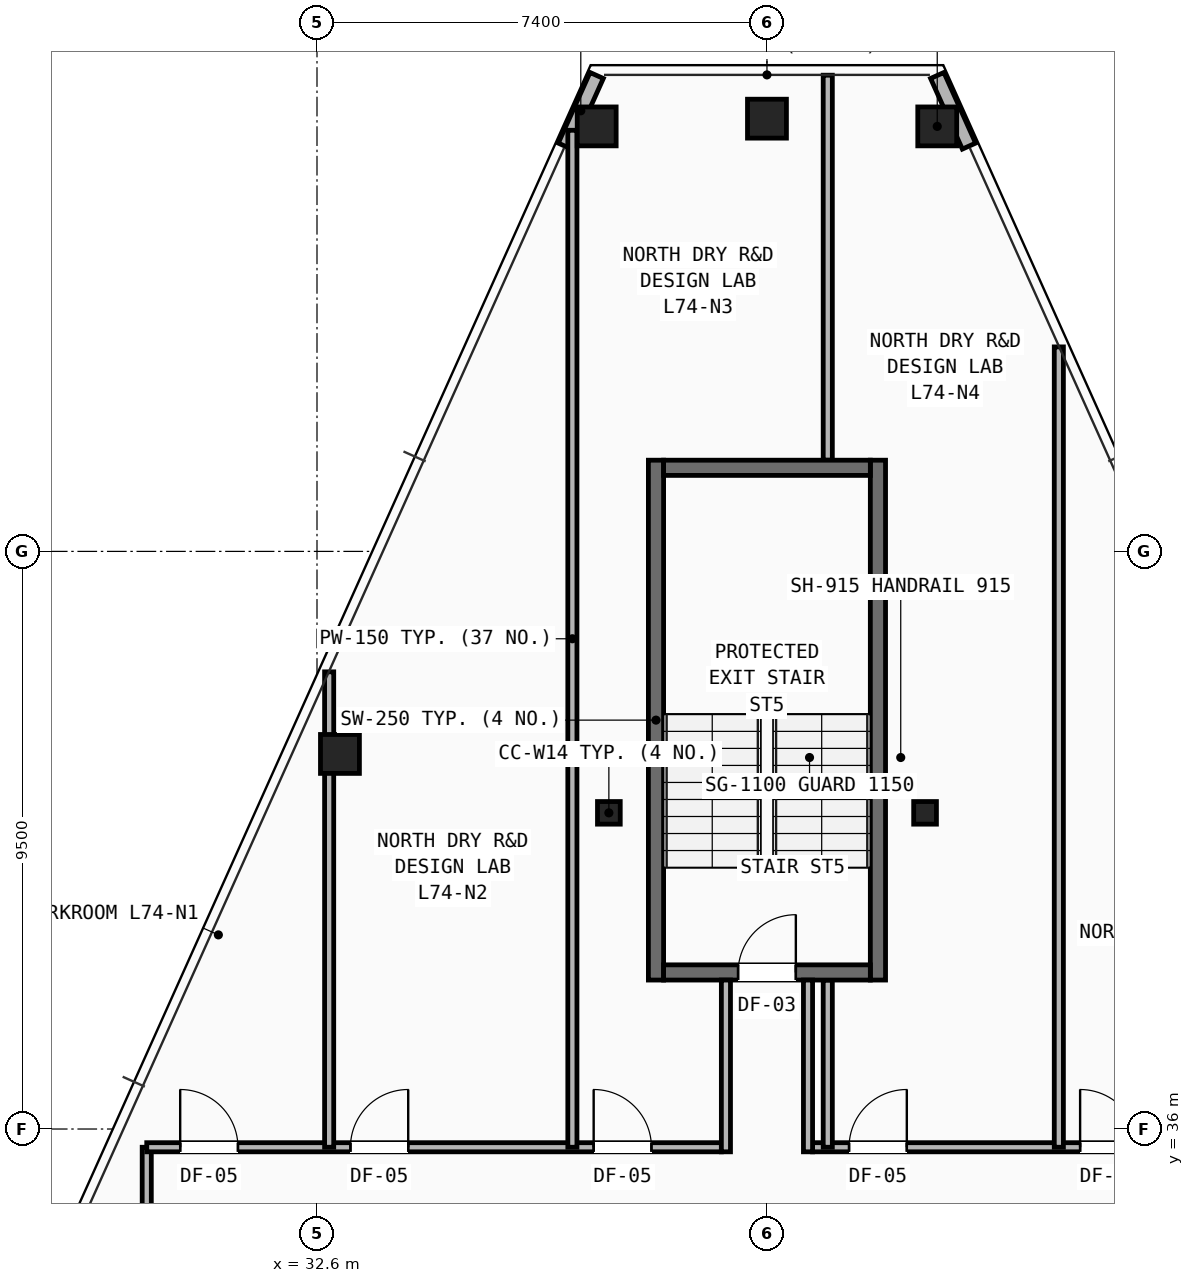
"""IFC4 building model, lengths in metres.
Left out: names, types, materials, properties, quantities, classifications, styles, units other than length and angle.
Written with IfcOpenShell. Run it as: python <this file> out.ifc"""

import sys

from ifc_helpers import new_model, si_unit, direction, frame, frame_2d, origin, origin_2d, place, context, subcontext, project, spatial, rectangle, hollow_rectangle, i_section, extrude, element, fill, save


model = new_model("IFC4")
c1 = context("Model", 3, precision=1e-05, world=origin(), true_north=direction((0.0, 1.0)))
c2 = subcontext(c1, "Body", "Model", "MODEL_VIEW")
j1 = project(units=[si_unit("LENGTHUNIT", "METRE"), si_unit("PLANEANGLEUNIT", "RADIAN")], contexts=[c1])
p1 = place(None, origin())
s1 = spatial("IfcSite", under=j1, at=p1, CompositionType="ELEMENT")
p2 = place(p1, origin())
s2 = spatial("IfcBuilding", under=s1, at=p2, CompositionType="ELEMENT")
p3 = place(p2, frame((0.0, 0.0, 262.0)))
s3 = spatial("IfcBuildingStorey", under=s2, at=p3, CompositionType="ELEMENT", Elevation=262.0)
for number, where, z_axis, x_axis in (
    (1, (37.4, 41.2, 0.0), (0.0, 0.0, 1.0), (1.0, 0.0, 0.0)),
    (2, (42.6, 41.2, 0.0), (0.0, 0.0, 1.0), (1.0, 0.0, 0.0)),
):
    element("IfcColumn", number, at=place(p3, frame(where, z_axis=z_axis, x_axis=x_axis)), inside=s3, PredefinedType="COLUMN", context=c2, shape_type="SweptSolid", body=[
        extrude(i_section(OverallWidth=0.374, OverallDepth=0.372, WebThickness=0.016, FlangeThickness=0.026, at=origin_2d()), origin(), (0.0, 0.0, 1.0), 3.5),
    ])
for number, where, z_axis, x_axis in (
    (3, (42.8, 52.49, 0.0), (0.0, 0.0, 1.0), (1.0, 0.0, 0.0)),
    (4, (40.0, 52.617, 0.0), (0.0, 0.0, 1.0), (1.0, 0.0, 0.0)),
    (5, (37.2, 52.49, 0.0), (0.0, 0.0, 1.0), (1.0, 0.0, 0.0)),
    (6, (32.977, 42.169, 0.0), (0.0, 0.0, 1.0), (1.0, 0.0, 0.0)),
):
    element("IfcColumn", number, at=place(p3, frame(where, z_axis=z_axis, x_axis=x_axis)), inside=s3, PredefinedType="COLUMN", context=c2, shape_type="SweptSolid", body=[
        extrude(hollow_rectangle(XDim=0.64, YDim=0.64, WallThickness=0.045, at=origin_2d()), origin(), (0.0, 0.0, 1.0), 3.5),
    ])
for number, where, z_axis, x_axis in (
    (7, (37.199, 53.328, 0.0), (0.0, 0.0, 1.0), (-0.41, -0.912, 0.0)),
    (8, (43.323, 52.166, 0.0), (0.0, 0.0, 1.0), (-0.41, 0.912, 0.0)),
):
    element("IfcWall", number, at=place(p3, frame(where, z_axis=z_axis, x_axis=x_axis)), inside=s3, PredefinedType="SHEAR", context=c2, shape_type="SweptSolid", body=[
        extrude(rectangle(XDim=1.274, YDim=0.24, at=frame_2d((0.637, 0.0))), origin(), (0.0, 0.0, 1.0), 2.623),
    ])
p4 = place(p3, frame((29.8, 16.4, 0.0), z_axis=(0.0, 0.0, 1.0), x_axis=(0.0, 1.0, 0.0)))
e9 = element("IfcWall", 9, at=p4, inside=s3, PredefinedType="PARTITIONING", context=c2, shape_type="SweptSolid", body=[
    extrude(rectangle(XDim=19.3, YDim=0.15, at=frame_2d((9.65, 0.0))), origin(), (0.0, 0.0, 1.0), 2.265),
])
p5 = place(p4, frame((0.35, 0.0, 0.0)))
e10 = element("IfcOpeningElement", 10, at=p5, cuts=e9, PredefinedType="OPENING", context=c2, shape_type="SweptSolid", body=[
    extrude(rectangle(XDim=0.95, YDim=2.1, at=frame_2d((0.475, 1.05))), frame((0.0, 0.085, 0.0), z_axis=(0.0, -1.0, 0.0), x_axis=(1.0, 0.0, 0.0)), (0.0, 0.0, 1.0), 0.17),
])
p6 = place(p4, frame((2.95, 0.0, 0.0)))
e11 = element("IfcOpeningElement", 11, at=p6, cuts=e9, PredefinedType="OPENING", context=c2, shape_type="SweptSolid", body=[
    extrude(rectangle(XDim=0.95, YDim=2.1, at=frame_2d((0.475, 1.05))), frame((0.0, 0.085, 0.0), z_axis=(0.0, -1.0, 0.0), x_axis=(1.0, 0.0, 0.0)), (0.0, 0.0, 1.0), 0.17),
])
p7 = place(p4, frame((6.15, 0.0, 0.0)))
e12 = element("IfcOpeningElement", 12, at=p7, cuts=e9, PredefinedType="OPENING", context=c2, shape_type="SweptSolid", body=[
    extrude(rectangle(XDim=0.95, YDim=2.1, at=frame_2d((0.475, 1.05))), frame((0.0, 0.085, 0.0), z_axis=(0.0, -1.0, 0.0), x_axis=(1.0, 0.0, 0.0)), (0.0, 0.0, 1.0), 0.17),
])
p8 = place(p4, frame((9.45, 0.0, 0.0)))
e13 = element("IfcOpeningElement", 13, at=p8, cuts=e9, PredefinedType="OPENING", context=c2, shape_type="SweptSolid", body=[
    extrude(rectangle(XDim=0.95, YDim=2.1, at=frame_2d((0.475, 1.05))), frame((0.0, 0.085, 0.0), z_axis=(0.0, -1.0, 0.0), x_axis=(1.0, 0.0, 0.0)), (0.0, 0.0, 1.0), 0.17),
])
p9 = place(p4, frame((12.95, 0.0, 0.0)))
e14 = element("IfcOpeningElement", 14, at=p9, cuts=e9, PredefinedType="OPENING", context=c2, shape_type="SweptSolid", body=[
    extrude(rectangle(XDim=0.95, YDim=2.1, at=frame_2d((0.475, 1.05))), frame((0.0, 0.085, 0.0), z_axis=(0.0, -1.0, 0.0), x_axis=(1.0, 0.0, 0.0)), (0.0, 0.0, 1.0), 0.17),
])
p10 = place(p3, frame((29.8, 35.7, 0.0), z_axis=(0.0, 0.0, 1.0), x_axis=(1.0, 0.0, 0.0)))
e15 = element("IfcWall", 15, at=p10, inside=s3, PredefinedType="PARTITIONING", context=c2, shape_type="SweptSolid", body=[
    extrude(rectangle(XDim=9.45, YDim=0.15, at=frame_2d((4.725, 0.0))), origin(), (0.0, 0.0, 1.0), 2.628),
])
p11 = place(p10, frame((0.55, 0.0, 0.0)))
e16 = element("IfcOpeningElement", 16, at=p11, cuts=e15, PredefinedType="OPENING", context=c2, shape_type="SweptSolid", body=[
    extrude(rectangle(XDim=0.95, YDim=2.1, at=frame_2d((0.475, 1.05))), frame((0.0, 0.085, 0.0), z_axis=(0.0, -1.0, 0.0), x_axis=(1.0, 0.0, 0.0)), (0.0, 0.0, 1.0), 0.17),
])
p12 = place(p10, frame((3.35, 0.0, 0.0)))
e17 = element("IfcOpeningElement", 17, at=p12, cuts=e15, PredefinedType="OPENING", context=c2, shape_type="SweptSolid", body=[
    extrude(rectangle(XDim=0.95, YDim=2.1, at=frame_2d((0.475, 1.05))), frame((0.0, 0.085, 0.0), z_axis=(0.0, -1.0, 0.0), x_axis=(1.0, 0.0, 0.0)), (0.0, 0.0, 1.0), 0.17),
])
p13 = place(p10, frame((7.35, 0.0, 0.0)))
e18 = element("IfcOpeningElement", 18, at=p13, cuts=e15, PredefinedType="OPENING", context=c2, shape_type="SweptSolid", body=[
    extrude(rectangle(XDim=0.95, YDim=2.1, at=frame_2d((0.475, 1.05))), frame((0.0, 0.085, 0.0), z_axis=(0.0, -1.0, 0.0), x_axis=(1.0, 0.0, 0.0)), (0.0, 0.0, 1.0), 0.17),
])
p14 = place(p3, frame((40.75, 35.7, 0.0), z_axis=(0.0, 0.0, 1.0), x_axis=(1.0, 0.0, 0.0)))
e19 = element("IfcWall", 19, at=p14, inside=s3, PredefinedType="PARTITIONING", context=c2, shape_type="SweptSolid", body=[
    extrude(rectangle(XDim=6.05, YDim=0.15, at=frame_2d((3.025, 0.0))), origin(), (0.0, 0.0, 1.0), 3.25),
])
p15 = place(p14, frame((0.6, 0.0, 0.0)))
e20 = element("IfcOpeningElement", 20, at=p15, cuts=e19, PredefinedType="OPENING", context=c2, shape_type="SweptSolid", body=[
    extrude(rectangle(XDim=0.95, YDim=2.1, at=frame_2d((0.475, 1.05))), frame((0.0, 0.085, 0.0), z_axis=(0.0, -1.0, 0.0), x_axis=(1.0, 0.0, 0.0)), (0.0, 0.0, 1.0), 0.17),
])
p16 = place(p14, frame((4.4, 0.0, 0.0)))
e21 = element("IfcOpeningElement", 21, at=p16, cuts=e19, PredefinedType="OPENING", context=c2, shape_type="SweptSolid", body=[
    extrude(rectangle(XDim=0.95, YDim=2.1, at=frame_2d((0.475, 1.05))), frame((0.0, 0.085, 0.0), z_axis=(0.0, -1.0, 0.0), x_axis=(1.0, 0.0, 0.0)), (0.0, 0.0, 1.0), 0.17),
])
p17 = place(p3, frame((32.8, 35.7, 0.0), z_axis=(0.0, 0.0, 1.0), x_axis=(0.0, 1.0, 0.0)))
e22 = element("IfcWall", 22, at=p17, inside=s3, PredefinedType="PARTITIONING", context=c2, shape_type="SweptSolid", body=[
    extrude(rectangle(XDim=7.819, YDim=0.15, at=frame_2d((3.91, 0.0))), origin(), (0.0, 0.0, 1.0), 2.265),
])
p18 = place(p3, frame((36.8, 35.7, 0.0), z_axis=(0.0, 0.0, 1.0), x_axis=(0.0, 1.0, 0.0)))
e23 = element("IfcWall", 23, at=p18, inside=s3, PredefinedType="PARTITIONING", context=c2, shape_type="SweptSolid", body=[
    extrude(rectangle(XDim=16.726, YDim=0.15, at=frame_2d((8.363, 0.0))), origin(), (0.0, 0.0, 1.0), 2.265),
])
p19 = place(p3, frame((41.0, 35.7, 0.0), z_axis=(0.0, 0.0, 1.0), x_axis=(0.0, 1.0, 0.0)))
e24 = element("IfcWall", 24, at=p19, inside=s3, PredefinedType="PARTITIONING", context=c2, shape_type="SweptSolid", body=[
    extrude(rectangle(XDim=2.75, YDim=0.15, at=frame_2d((1.375, 0.0))), origin(), (0.0, 0.0, 1.0), 3.25),
])
p20 = place(p3, frame((41.0, 47.0, 0.0), z_axis=(0.0, 0.0, 1.0), x_axis=(0.0, 1.0, 0.0)))
e25 = element("IfcWall", 25, at=p20, inside=s3, PredefinedType="PARTITIONING", context=c2, shape_type="SweptSolid", body=[
    extrude(rectangle(XDim=6.332, YDim=0.15, at=frame_2d((3.166, 0.0))), origin(), (0.0, 0.0, 1.0), 2.628),
])
p21 = place(p3, frame((44.8, 35.7, 0.0), z_axis=(0.0, 0.0, 1.0), x_axis=(0.0, 1.0, 0.0)))
e26 = element("IfcWall", 26, at=p21, inside=s3, PredefinedType="PARTITIONING", context=c2, shape_type="SweptSolid", body=[
    extrude(rectangle(XDim=13.163, YDim=0.15, at=frame_2d((6.582, 0.0))), origin(), (0.0, 0.0, 1.0), 2.265),
])
for number, where, z_axis, x_axis in (
    (27, (38.175, 38.45, 0.0), (0.0, 0.0, 1.0), (0.0, 1.0, 0.0)),
    (28, (41.825, 38.45, 0.0), (0.0, 0.0, 1.0), (0.0, 1.0, 0.0)),
):
    element("IfcWall", number, at=place(p3, frame(where, z_axis=z_axis, x_axis=x_axis)), inside=s3, PredefinedType="SHEAR", context=c2, shape_type="SweptSolid", body=[
        extrude(rectangle(XDim=8.55, YDim=0.25, at=frame_2d((4.275, 0.0))), origin(), (0.0, 0.0, 1.0), 3.25),
    ])
p22 = place(p3, frame((38.3, 38.575, 0.0), z_axis=(0.0, 0.0, 1.0), x_axis=(1.0, 0.0, 0.0)))
e29 = element("IfcWall", 29, at=p22, inside=s3, PredefinedType="SHEAR", context=c2, shape_type="SweptSolid", body=[
    extrude(rectangle(XDim=3.4, YDim=0.25, at=frame_2d((1.7, 0.0))), origin(), (0.0, 0.0, 1.0), 3.25),
])
p23 = place(p22, frame((1.225, 0.0, 0.0)))
e30 = element("IfcOpeningElement", 30, at=p23, cuts=e29, PredefinedType="OPENING", context=c2, shape_type="SweptSolid", body=[
    extrude(rectangle(XDim=0.95, YDim=2.1, at=frame_2d((0.475, 1.05))), frame((0.0, 0.135, 0.0), z_axis=(0.0, -1.0, 0.0), x_axis=(1.0, 0.0, 0.0)), (0.0, 0.0, 1.0), 0.27),
])
p24 = place(p3, frame((38.3, 46.875, 0.0), z_axis=(0.0, 0.0, 1.0), x_axis=(1.0, 0.0, 0.0)))
e31 = element("IfcWall", 31, at=p24, inside=s3, PredefinedType="SHEAR", context=c2, shape_type="SweptSolid", body=[
    extrude(rectangle(XDim=3.4, YDim=0.25, at=frame_2d((1.7, 0.0))), origin(), (0.0, 0.0, 1.0), 3.25),
])
for number, where, z_axis, x_axis in (
    (32, (39.325, 35.625, 0.0), (0.0, 0.0, 1.0), (0.0, 1.0, 0.0)),
    (33, (40.675, 35.625, 0.0), (0.0, 0.0, 1.0), (0.0, 1.0, 0.0)),
):
    element("IfcWall", number, at=place(p3, frame(where, z_axis=z_axis, x_axis=x_axis)), inside=s3, PredefinedType="PARTITIONING", context=c2, shape_type="SweptSolid", body=[
        extrude(rectangle(XDim=2.825, YDim=0.15, at=frame_2d((1.413, 0.0))), origin(), (0.0, 0.0, 1.0), 3.25),
    ])
p25 = place(p11, origin())
e34 = element("IfcDoor", 34, at=p25, inside=s3, OperationType="SINGLE_SWING_LEFT", PredefinedType="DOOR", context=c2, shape_type="SweptSolid", body=[
    extrude(rectangle(XDim=0.95, YDim=2.1, at=frame_2d((0.475, 1.05))), frame((0.0, 0.025, 0.0), z_axis=(0.0, -1.0, 0.0), x_axis=(1.0, 0.0, 0.0)), (0.0, 0.0, 1.0), 0.05),
])
fill(e16, e34)
p26 = place(p12, origin())
e35 = element("IfcDoor", 35, at=p26, inside=s3, OperationType="SINGLE_SWING_RIGHT", PredefinedType="DOOR", context=c2, shape_type="SweptSolid", body=[
    extrude(rectangle(XDim=0.95, YDim=2.1, at=frame_2d((0.475, 1.05))), frame((0.0, 0.025, 0.0), z_axis=(0.0, -1.0, 0.0), x_axis=(1.0, 0.0, 0.0)), (0.0, 0.0, 1.0), 0.05),
])
fill(e17, e35)
p27 = place(p13, origin())
e36 = element("IfcDoor", 36, at=p27, inside=s3, OperationType="SINGLE_SWING_LEFT", PredefinedType="DOOR", context=c2, shape_type="SweptSolid", body=[
    extrude(rectangle(XDim=0.95, YDim=2.1, at=frame_2d((0.475, 1.05))), frame((0.0, 0.025, 0.0), z_axis=(0.0, -1.0, 0.0), x_axis=(1.0, 0.0, 0.0)), (0.0, 0.0, 1.0), 0.05),
])
fill(e18, e36)
p28 = place(p15, origin())
e37 = element("IfcDoor", 37, at=p28, inside=s3, OperationType="SINGLE_SWING_RIGHT", PredefinedType="DOOR", context=c2, shape_type="SweptSolid", body=[
    extrude(rectangle(XDim=0.95, YDim=2.1, at=frame_2d((0.475, 1.05))), frame((0.0, 0.025, 0.0), z_axis=(0.0, -1.0, 0.0), x_axis=(1.0, 0.0, 0.0)), (0.0, 0.0, 1.0), 0.05),
])
fill(e20, e37)
p29 = place(p16, origin())
e38 = element("IfcDoor", 38, at=p29, inside=s3, OperationType="SINGLE_SWING_LEFT", PredefinedType="DOOR", context=c2, shape_type="SweptSolid", body=[
    extrude(rectangle(XDim=0.95, YDim=2.1, at=frame_2d((0.475, 1.05))), frame((0.0, 0.025, 0.0), z_axis=(0.0, -1.0, 0.0), x_axis=(1.0, 0.0, 0.0)), (0.0, 0.0, 1.0), 0.05),
])
fill(e21, e38)
p30 = place(p23, origin())
e39 = element("IfcDoor", 39, at=p30, inside=s3, OperationType="SINGLE_SWING_RIGHT", PredefinedType="DOOR", context=c2, shape_type="SweptSolid", body=[
    extrude(rectangle(XDim=0.95, YDim=2.1, at=frame_2d((0.475, 1.05))), frame((0.0, 0.025, 0.0), z_axis=(0.0, -1.0, 0.0), x_axis=(1.0, 0.0, 0.0)), (0.0, 0.0, 1.0), 0.05),
])
fill(e30, e39)
save(model, sys.argv[1])
